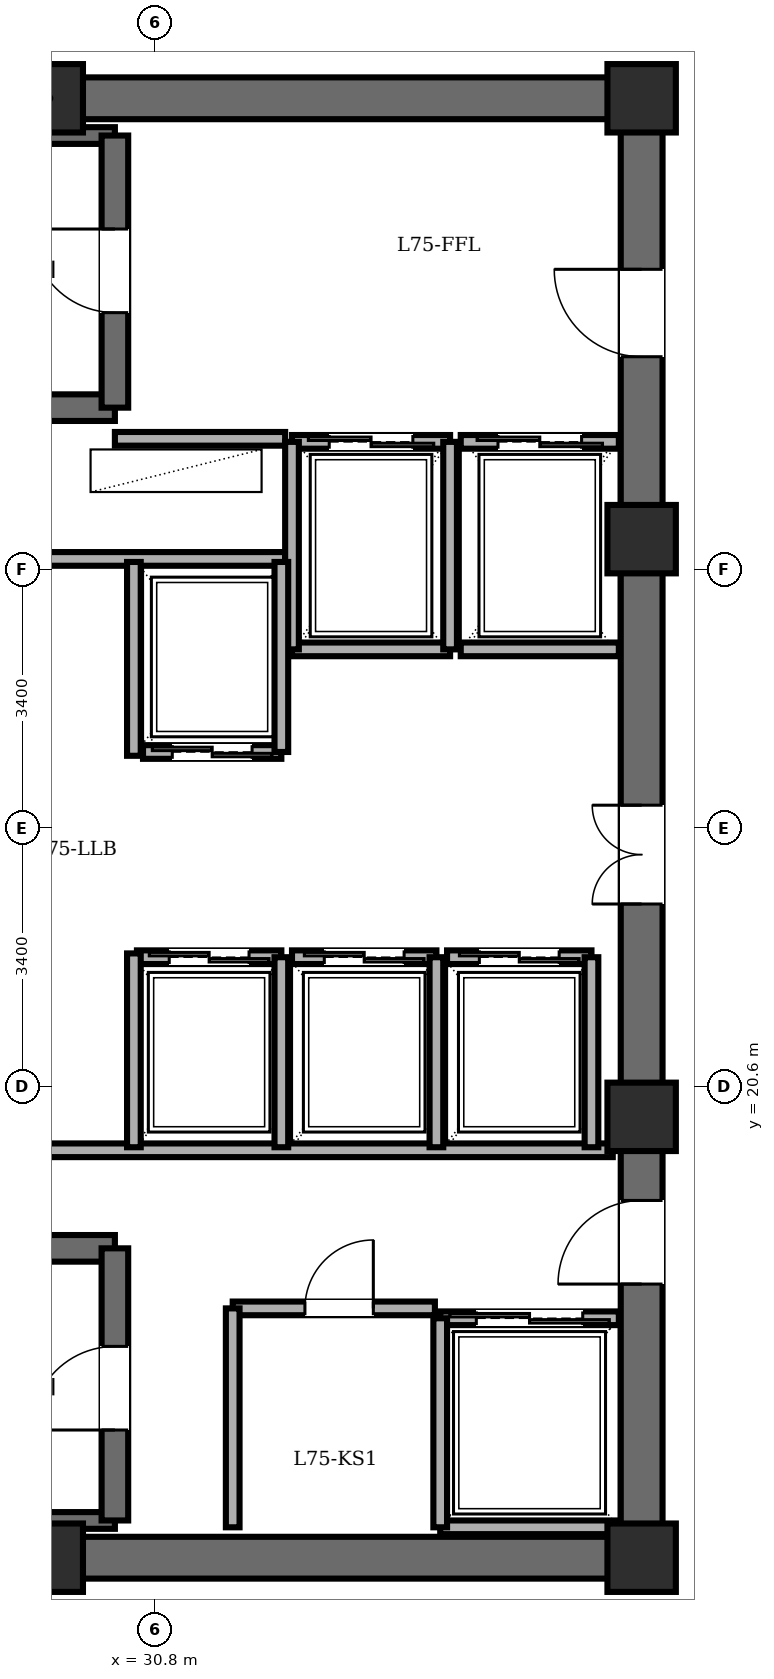
"""IFC4 building model, lengths in metres.
Left out: names, types, materials, properties, quantities, classifications, styles, units other than length and angle.
Written with IfcOpenShell. Run it as: python <this file> out.ifc"""

import sys

from ifc_helpers import new_model, si_unit, direction, frame, frame_2d, origin, origin_2d, place, context, subcontext, project, spatial, rectangle, extrude, element, fill, save


model = new_model("IFC4")
c1 = context("Model", 3, precision=1e-05, world=origin(), true_north=direction((0.0, 1.0)))
c2 = subcontext(c1, "Body", "Model", "MODEL_VIEW")
j1 = project(units=[si_unit("LENGTHUNIT", "METRE"), si_unit("PLANEANGLEUNIT", "RADIAN")], contexts=[c1])
p1 = place(None, origin())
s1 = spatial("IfcSite", under=j1, at=p1, CompositionType="ELEMENT")
p2 = place(p1, origin())
s2 = spatial("IfcBuilding", under=s1, at=p2, CompositionType="ELEMENT")
p3 = place(p2, frame((0.0, 0.0, 288.0)))
s3 = spatial("IfcBuildingStorey", under=s2, at=p3, CompositionType="ELEMENT", Elevation=288.0)
for number, where, z_axis, x_axis in (
    (1, (29.4, 14.4, 0.0), (0.0, 0.0, 1.0), (1.0, 0.0, 0.0)),
    (2, (37.2, 14.4, 0.0), (0.0, 0.0, 1.0), (1.0, 0.0, 0.0)),
    (3, (37.2, 20.2, 0.0), (0.0, 0.0, 1.0), (1.0, 0.0, 0.0)),
    (4, (37.2, 27.8, 0.0), (0.0, 0.0, 1.0), (1.0, 0.0, 0.0)),
    (5, (37.2, 33.6, 0.0), (0.0, 0.0, 1.0), (1.0, 0.0, 0.0)),
    (6, (29.4, 33.6, 0.0), (0.0, 0.0, 1.0), (1.0, 0.0, 0.0)),
):
    element("IfcColumn", number, at=place(p3, frame(where, z_axis=z_axis, x_axis=x_axis)), inside=s3, PredefinedType="COLUMN", context=c2, shape_type="SweptSolid", body=[
        extrude(rectangle(XDim=0.9, YDim=0.9, at=origin_2d()), origin(), (0.0, 0.0, 1.0), 3.65),
    ])
for number, where, z_axis, x_axis in (
    (7, (21.6, 33.6, 0.0), (0.0, 0.0, 1.0), (1.0, 0.0, 0.0)),
    (8, (37.2, 14.4, 0.0), (0.0, 0.0, 1.0), (-1.0, 0.0, 0.0)),
):
    element("IfcWall", number, at=place(p3, frame(where, z_axis=z_axis, x_axis=x_axis)), inside=s3, PredefinedType="SHEAR", context=c2, shape_type="SweptSolid", body=[
        extrude(rectangle(XDim=15.6, YDim=0.55, at=frame_2d((7.8, 0.0))), origin(), (0.0, 0.0, 1.0), 3.45),
    ])
p4 = place(p3, frame((37.2, 14.4, 0.0), z_axis=(0.0, 0.0, 1.0), x_axis=(0.0, 1.0, 0.0)))
e9 = element("IfcWall", 9, at=p4, inside=s3, PredefinedType="SHEAR", context=c2, shape_type="SweptSolid", body=[
    extrude(rectangle(XDim=19.2, YDim=0.55, at=frame_2d((9.6, 0.0))), origin(), (0.0, 0.0, 1.0), 3.45),
])
p5 = place(p4, frame((15.8, 0.0, 0.0)))
e10 = element("IfcOpeningElement", 10, at=p5, cuts=e9, PredefinedType="OPENING", context=c2, shape_type="SweptSolid", body=[
    extrude(rectangle(XDim=1.15, YDim=2.15, at=frame_2d((0.575, 1.075))), frame((0.0, 0.285, 0.0), z_axis=(0.0, -1.0, 0.0), x_axis=(1.0, 0.0, 0.0)), (0.0, 0.0, 1.0), 0.57),
])
p6 = place(p4, frame((3.6, 0.0, 0.0)))
e11 = element("IfcOpeningElement", 11, at=p6, cuts=e9, PredefinedType="OPENING", context=c2, shape_type="SweptSolid", body=[
    extrude(rectangle(XDim=1.1, YDim=2.15, at=frame_2d((0.55, 1.075))), frame((0.0, 0.285, 0.0), z_axis=(0.0, -1.0, 0.0), x_axis=(1.0, 0.0, 0.0)), (0.0, 0.0, 1.0), 0.57),
])
p7 = place(p4, frame((8.6, 0.0, 0.0)))
e12 = element("IfcOpeningElement", 12, at=p7, cuts=e9, PredefinedType="OPENING", context=c2, shape_type="SweptSolid", body=[
    extrude(rectangle(XDim=1.3, YDim=2.2, at=frame_2d((0.65, 1.1))), frame((0.0, 0.285, 0.0), z_axis=(0.0, -1.0, 0.0), x_axis=(1.0, 0.0, 0.0)), (0.0, 0.0, 1.0), 0.57),
])
p8 = place(p3, frame((22.48, 29.53, 0.0), z_axis=(0.0, 0.0, 1.0), x_axis=(1.0, 0.0, 0.0)))
e13 = element("IfcWall", 13, at=p8, inside=s3, PredefinedType="SOLIDWALL", context=c2, shape_type="SweptSolid", body=[
    extrude(rectangle(XDim=7.79, YDim=0.35, at=frame_2d((3.895, 0.0))), origin(), (0.0, 0.0, 1.0), 3.45),
])
p9 = place(p3, frame((22.48, 33.11, 0.0), z_axis=(0.0, 0.0, 1.0), x_axis=(1.0, 0.0, 0.0)))
e14 = element("IfcWall", 14, at=p9, inside=s3, PredefinedType="PARTITIONING", context=c2, shape_type="SweptSolid", body=[
    extrude(rectangle(XDim=7.79, YDim=0.22, at=frame_2d((3.895, 0.0))), origin(), (0.0, 0.0, 1.0), 3.45),
])
p10 = place(p3, frame((30.27, 29.53, 0.0), z_axis=(0.0, 0.0, 1.0), x_axis=(0.0, 1.0, 0.0)))
e15 = element("IfcWall", 15, at=p10, inside=s3, PredefinedType="SOLIDWALL", context=c2, shape_type="SweptSolid", body=[
    extrude(rectangle(XDim=3.58, YDim=0.35, at=frame_2d((1.79, 0.0))), origin(), (0.0, 0.0, 1.0), 3.45),
])
p11 = place(p10, frame((1.25, 0.0, 0.0)))
e16 = element("IfcOpeningElement", 16, at=p11, cuts=e15, PredefinedType="OPENING", context=c2, shape_type="SweptSolid", body=[
    extrude(rectangle(XDim=1.1, YDim=2.15, at=frame_2d((0.55, 1.075))), frame((0.0, 0.185, 0.0), z_axis=(0.0, -1.0, 0.0), x_axis=(1.0, 0.0, 0.0)), (0.0, 0.0, 1.0), 0.37),
])
p12 = place(p3, frame((22.48, 18.47, 0.0), z_axis=(0.0, 0.0, 1.0), x_axis=(1.0, 0.0, 0.0)))
e17 = element("IfcWall", 17, at=p12, inside=s3, PredefinedType="SOLIDWALL", context=c2, shape_type="SweptSolid", body=[
    extrude(rectangle(XDim=7.79, YDim=0.35, at=frame_2d((3.895, 0.0))), origin(), (0.0, 0.0, 1.0), 3.45),
])
p13 = place(p3, frame((22.48, 14.89, 0.0), z_axis=(0.0, 0.0, 1.0), x_axis=(1.0, 0.0, 0.0)))
e18 = element("IfcWall", 18, at=p13, inside=s3, PredefinedType="PARTITIONING", context=c2, shape_type="SweptSolid", body=[
    extrude(rectangle(XDim=7.79, YDim=0.22, at=frame_2d((3.895, 0.0))), origin(), (0.0, 0.0, 1.0), 3.45),
])
p14 = place(p3, frame((30.27, 14.89, 0.0), z_axis=(0.0, 0.0, 1.0), x_axis=(0.0, 1.0, 0.0)))
e19 = element("IfcWall", 19, at=p14, inside=s3, PredefinedType="SOLIDWALL", context=c2, shape_type="SweptSolid", body=[
    extrude(rectangle(XDim=3.58, YDim=0.35, at=frame_2d((1.79, 0.0))), origin(), (0.0, 0.0, 1.0), 3.45),
])
p15 = place(p14, frame((1.19, 0.0, 0.0)))
e20 = element("IfcOpeningElement", 20, at=p15, cuts=e19, PredefinedType="OPENING", context=c2, shape_type="SweptSolid", body=[
    extrude(rectangle(XDim=1.1, YDim=2.15, at=frame_2d((0.55, 1.075))), frame((0.0, 0.185, 0.0), z_axis=(0.0, -1.0, 0.0), x_axis=(1.0, 0.0, 0.0)), (0.0, 0.0, 1.0), 0.37),
])
p16 = place(p3, frame((30.27, 29.12, 0.0), z_axis=(0.0, 0.0, 1.0), x_axis=(1.0, 0.0, 0.0)))
e21 = element("IfcWall", 21, at=p16, inside=s3, PredefinedType="PARTITIONING", context=c2, shape_type="SweptSolid", body=[
    extrude(rectangle(XDim=2.24, YDim=0.18, at=frame_2d((1.12, 0.0))), origin(), (0.0, 0.0, 1.0), 3.45),
])
p17 = place(p3, frame((21.95, 27.54, 0.0), z_axis=(0.0, 0.0, 1.0), x_axis=(1.0, 0.0, 0.0)))
e22 = element("IfcWall", 22, at=p17, inside=s3, PredefinedType="PARTITIONING", context=c2, shape_type="SweptSolid", body=[
    extrude(rectangle(XDim=10.56, YDim=0.18, at=frame_2d((5.28, 0.0))), origin(), (0.0, 0.0, 1.0), 3.45),
])
p18 = place(p3, frame((21.95, 19.76, 0.0), z_axis=(0.0, 0.0, 1.0), x_axis=(1.0, 0.0, 0.0)))
e23 = element("IfcWall", 23, at=p18, inside=s3, PredefinedType="PARTITIONING", context=c2, shape_type="SweptSolid", body=[
    extrude(rectangle(XDim=14.87, YDim=0.18, at=frame_2d((7.435, 0.0))), origin(), (0.0, 0.0, 1.0), 3.45),
])
p19 = place(p3, frame((31.82, 17.68, 0.0), z_axis=(0.0, 0.0, 1.0), x_axis=(1.0, 0.0, 0.0)))
e24 = element("IfcWall", 24, at=p19, inside=s3, PredefinedType="PARTITIONING", context=c2, shape_type="SweptSolid", body=[
    extrude(rectangle(XDim=2.66, YDim=0.18, at=frame_2d((1.33, 0.0))), origin(), (0.0, 0.0, 1.0), 3.45),
])
p20 = place(p19, frame((0.95, 0.0, 0.0)))
e25 = element("IfcOpeningElement", 25, at=p20, cuts=e24, PredefinedType="OPENING", context=c2, shape_type="SweptSolid", body=[
    extrude(rectangle(XDim=0.9, YDim=2.05, at=frame_2d((0.45, 1.025))), frame((0.0, 0.1, 0.0), z_axis=(0.0, -1.0, 0.0), x_axis=(1.0, 0.0, 0.0)), (0.0, 0.0, 1.0), 0.2),
])
p21 = place(p3, frame((31.82, 14.8, 0.0), z_axis=(0.0, 0.0, 1.0), x_axis=(0.0, 1.0, 0.0)))
e26 = element("IfcWall", 26, at=p21, inside=s3, PredefinedType="PARTITIONING", context=c2, shape_type="SweptSolid", body=[
    extrude(rectangle(XDim=2.88, YDim=0.18, at=frame_2d((1.44, 0.0))), origin(), (0.0, 0.0, 1.0), 3.45),
])
p22 = place(p3, frame((32.6, 29.08, 0.0), z_axis=(0.0, 0.0, 1.0), x_axis=(1.0, 0.0, 0.0)))
e27 = element("IfcWall", 27, at=p22, inside=s3, PredefinedType="PARTITIONING", context=c2, shape_type="SweptSolid", body=[
    extrude(rectangle(XDim=2.08, YDim=0.18, at=frame_2d((1.04, 0.0))), origin(), (0.0, 0.0, 1.0), 3.45),
])
p23 = place(p22, frame((0.49, 0.0, 0.0)))
e28 = element("IfcOpeningElement", 28, at=p23, cuts=e27, PredefinedType="OPENING", context=c2, shape_type="SweptSolid", body=[
    extrude(rectangle(XDim=1.1, YDim=2.2, at=frame_2d((0.55, 1.1))), frame((0.0, 0.1, 0.0), z_axis=(0.0, -1.0, 0.0), x_axis=(1.0, 0.0, 0.0)), (0.0, 0.0, 1.0), 0.2),
])
p24 = place(p3, frame((34.68, 26.35, 0.0), z_axis=(0.0, 0.0, 1.0), x_axis=(-1.0, 0.0, 0.0)))
e29 = element("IfcWall", 29, at=p24, inside=s3, PredefinedType="PARTITIONING", context=c2, shape_type="SweptSolid", body=[
    extrude(rectangle(XDim=2.08, YDim=0.18, at=frame_2d((1.04, 0.0))), origin(), (0.0, 0.0, 1.0), 3.45),
])
for number, where, z_axis, x_axis in (
    (30, (34.68, 26.35, 0.0), (0.0, 0.0, 1.0), (0.0, 1.0, 0.0)),
    (31, (32.6, 29.08, 0.0), (0.0, 0.0, 1.0), (0.0, -1.0, 0.0)),
):
    element("IfcWall", number, at=place(p3, frame(where, z_axis=z_axis, x_axis=x_axis)), inside=s3, PredefinedType="PARTITIONING", context=c2, shape_type="SweptSolid", body=[
        extrude(rectangle(XDim=2.73, YDim=0.18, at=frame_2d((1.365, 0.0))), origin(), (0.0, 0.0, 1.0), 3.45),
    ])
p25 = place(p3, frame((34.82, 29.08, 0.0), z_axis=(0.0, 0.0, 1.0), x_axis=(1.0, 0.0, 0.0)))
e32 = element("IfcWall", 32, at=p25, inside=s3, PredefinedType="PARTITIONING", context=c2, shape_type="SweptSolid", body=[
    extrude(rectangle(XDim=2.08, YDim=0.18, at=frame_2d((1.04, 0.0))), origin(), (0.0, 0.0, 1.0), 3.45),
])
p26 = place(p25, frame((0.49, 0.0, 0.0)))
e33 = element("IfcOpeningElement", 33, at=p26, cuts=e32, PredefinedType="OPENING", context=c2, shape_type="SweptSolid", body=[
    extrude(rectangle(XDim=1.1, YDim=2.2, at=frame_2d((0.55, 1.1))), frame((0.0, 0.1, 0.0), z_axis=(0.0, -1.0, 0.0), x_axis=(1.0, 0.0, 0.0)), (0.0, 0.0, 1.0), 0.2),
])
p27 = place(p3, frame((36.9, 26.35, 0.0), z_axis=(0.0, 0.0, 1.0), x_axis=(-1.0, 0.0, 0.0)))
e34 = element("IfcWall", 34, at=p27, inside=s3, PredefinedType="PARTITIONING", context=c2, shape_type="SweptSolid", body=[
    extrude(rectangle(XDim=2.08, YDim=0.18, at=frame_2d((1.04, 0.0))), origin(), (0.0, 0.0, 1.0), 3.45),
])
p28 = place(p3, frame((34.55, 17.55, 0.0), z_axis=(0.0, 0.0, 1.0), x_axis=(1.0, 0.0, 0.0)))
e35 = element("IfcWall", 35, at=p28, inside=s3, PredefinedType="PARTITIONING", context=c2, shape_type="SweptSolid", body=[
    extrude(rectangle(XDim=2.35, YDim=0.18, at=frame_2d((1.175, 0.0))), origin(), (0.0, 0.0, 1.0), 3.45),
])
p29 = place(p28, frame((0.475, 0.0, 0.0)))
e36 = element("IfcOpeningElement", 36, at=p29, cuts=e35, PredefinedType="OPENING", context=c2, shape_type="SweptSolid", body=[
    extrude(rectangle(XDim=1.4, YDim=2.3, at=frame_2d((0.7, 1.15))), frame((0.0, 0.1, 0.0), z_axis=(0.0, -1.0, 0.0), x_axis=(1.0, 0.0, 0.0)), (0.0, 0.0, 1.0), 0.2),
])
p30 = place(p3, frame((36.9, 14.8, 0.0), z_axis=(0.0, 0.0, 1.0), x_axis=(-1.0, 0.0, 0.0)))
e37 = element("IfcWall", 37, at=p30, inside=s3, PredefinedType="PARTITIONING", context=c2, shape_type="SweptSolid", body=[
    extrude(rectangle(XDim=2.35, YDim=0.18, at=frame_2d((1.175, 0.0))), origin(), (0.0, 0.0, 1.0), 3.45),
])
p31 = place(p3, frame((34.55, 17.55, 0.0), z_axis=(0.0, 0.0, 1.0), x_axis=(0.0, -1.0, 0.0)))
e38 = element("IfcWall", 38, at=p31, inside=s3, PredefinedType="PARTITIONING", context=c2, shape_type="SweptSolid", body=[
    extrude(rectangle(XDim=2.75, YDim=0.18, at=frame_2d((1.375, 0.0))), origin(), (0.0, 0.0, 1.0), 3.45),
])
p32 = place(p3, frame((32.46, 25.0, 0.0), z_axis=(0.0, 0.0, 1.0), x_axis=(-1.0, 0.0, 0.0)))
e39 = element("IfcWall", 39, at=p32, inside=s3, PredefinedType="PARTITIONING", context=c2, shape_type="SweptSolid", body=[
    extrude(rectangle(XDim=1.82, YDim=0.18, at=frame_2d((0.91, 0.0))), origin(), (0.0, 0.0, 1.0), 3.45),
])
p33 = place(p32, frame((0.385, 0.0, 0.0)))
e40 = element("IfcOpeningElement", 40, at=p33, cuts=e39, PredefinedType="OPENING", context=c2, shape_type="SweptSolid", body=[
    extrude(rectangle(XDim=1.05, YDim=2.2, at=frame_2d((0.525, 1.1))), frame((0.0, 0.1, 0.0), z_axis=(0.0, -1.0, 0.0), x_axis=(1.0, 0.0, 0.0)), (0.0, 0.0, 1.0), 0.2),
])
p34 = place(p3, frame((32.46, 25.0, 0.0), z_axis=(0.0, 0.0, 1.0), x_axis=(0.0, 1.0, 0.0)))
e41 = element("IfcWall", 41, at=p34, inside=s3, PredefinedType="PARTITIONING", context=c2, shape_type="SweptSolid", body=[
    extrude(rectangle(XDim=2.5, YDim=0.18, at=frame_2d((1.25, 0.0))), origin(), (0.0, 0.0, 1.0), 3.45),
])
p35 = place(p3, frame((30.56, 22.3, 0.0), z_axis=(0.0, 0.0, 1.0), x_axis=(1.0, 0.0, 0.0)))
e42 = element("IfcWall", 42, at=p35, inside=s3, PredefinedType="PARTITIONING", context=c2, shape_type="SweptSolid", body=[
    extrude(rectangle(XDim=1.9, YDim=0.18, at=frame_2d((0.95, 0.0))), origin(), (0.0, 0.0, 1.0), 3.45),
])
p36 = place(p35, frame((0.425, 0.0, 0.0)))
e43 = element("IfcOpeningElement", 43, at=p36, cuts=e42, PredefinedType="OPENING", context=c2, shape_type="SweptSolid", body=[
    extrude(rectangle(XDim=1.05, YDim=2.2, at=frame_2d((0.525, 1.1))), frame((0.0, 0.1, 0.0), z_axis=(0.0, -1.0, 0.0), x_axis=(1.0, 0.0, 0.0)), (0.0, 0.0, 1.0), 0.2),
])
p37 = place(p3, frame((32.46, 19.8, 0.0), z_axis=(0.0, 0.0, 1.0), x_axis=(0.0, 1.0, 0.0)))
e44 = element("IfcWall", 44, at=p37, inside=s3, PredefinedType="PARTITIONING", context=c2, shape_type="SweptSolid", body=[
    extrude(rectangle(XDim=2.5, YDim=0.18, at=frame_2d((1.25, 0.0))), origin(), (0.0, 0.0, 1.0), 3.45),
])
p38 = place(p3, frame((32.6, 22.3, 0.0), z_axis=(0.0, 0.0, 1.0), x_axis=(1.0, 0.0, 0.0)))
e45 = element("IfcWall", 45, at=p38, inside=s3, PredefinedType="PARTITIONING", context=c2, shape_type="SweptSolid", body=[
    extrude(rectangle(XDim=1.9, YDim=0.18, at=frame_2d((0.95, 0.0))), origin(), (0.0, 0.0, 1.0), 3.45),
])
p39 = place(p38, frame((0.425, 0.0, 0.0)))
e46 = element("IfcOpeningElement", 46, at=p39, cuts=e45, PredefinedType="OPENING", context=c2, shape_type="SweptSolid", body=[
    extrude(rectangle(XDim=1.05, YDim=2.2, at=frame_2d((0.525, 1.1))), frame((0.0, 0.1, 0.0), z_axis=(0.0, -1.0, 0.0), x_axis=(1.0, 0.0, 0.0)), (0.0, 0.0, 1.0), 0.2),
])
p40 = place(p3, frame((34.5, 19.8, 0.0), z_axis=(0.0, 0.0, 1.0), x_axis=(0.0, 1.0, 0.0)))
e47 = element("IfcWall", 47, at=p40, inside=s3, PredefinedType="PARTITIONING", context=c2, shape_type="SweptSolid", body=[
    extrude(rectangle(XDim=2.5, YDim=0.18, at=frame_2d((1.25, 0.0))), origin(), (0.0, 0.0, 1.0), 3.45),
])
p41 = place(p3, frame((34.64, 22.3, 0.0), z_axis=(0.0, 0.0, 1.0), x_axis=(1.0, 0.0, 0.0)))
e48 = element("IfcWall", 48, at=p41, inside=s3, PredefinedType="PARTITIONING", context=c2, shape_type="SweptSolid", body=[
    extrude(rectangle(XDim=1.9, YDim=0.18, at=frame_2d((0.95, 0.0))), origin(), (0.0, 0.0, 1.0), 3.45),
])
p42 = place(p41, frame((0.425, 0.0, 0.0)))
e49 = element("IfcOpeningElement", 49, at=p42, cuts=e48, PredefinedType="OPENING", context=c2, shape_type="SweptSolid", body=[
    extrude(rectangle(XDim=1.05, YDim=2.2, at=frame_2d((0.525, 1.1))), frame((0.0, 0.1, 0.0), z_axis=(0.0, -1.0, 0.0), x_axis=(1.0, 0.0, 0.0)), (0.0, 0.0, 1.0), 0.2),
])
p43 = place(p3, frame((36.54, 19.8, 0.0), z_axis=(0.0, 0.0, 1.0), x_axis=(0.0, 1.0, 0.0)))
e50 = element("IfcWall", 50, at=p43, inside=s3, PredefinedType="PARTITIONING", context=c2, shape_type="SweptSolid", body=[
    extrude(rectangle(XDim=2.5, YDim=0.18, at=frame_2d((1.25, 0.0))), origin(), (0.0, 0.0, 1.0), 3.45),
])
for number, where, z_axis, x_axis in (
    (51, (30.52, 24.95, 0.0), (0.0, 0.0, 1.0), (0.0, 1.0, 0.0)),
    (52, (30.52, 19.8, 0.0), (0.0, 0.0, 1.0), (0.0, 1.0, 0.0)),
):
    element("IfcWall", number, at=place(p3, frame(where, z_axis=z_axis, x_axis=x_axis)), inside=s3, PredefinedType="PARTITIONING", context=c2, shape_type="SweptSolid", body=[
        extrude(rectangle(XDim=2.55, YDim=0.18, at=frame_2d((1.275, 0.0))), origin(), (0.0, 0.0, 1.0), 3.45),
    ])
p44 = place(p11, origin())
e53 = element("IfcDoor", 53, at=p44, inside=s3, OperationType="SINGLE_SWING_RIGHT", PredefinedType="DOOR", context=c2, shape_type="SweptSolid", body=[
    extrude(rectangle(XDim=1.1, YDim=2.15, at=frame_2d((0.55, 1.075))), frame((0.0, 0.025, 0.0), z_axis=(0.0, -1.0, 0.0), x_axis=(1.0, 0.0, 0.0)), (0.0, 0.0, 1.0), 0.05),
])
fill(e16, e53)
p45 = place(p15, origin())
e54 = element("IfcDoor", 54, at=p45, inside=s3, OperationType="SINGLE_SWING_LEFT", PredefinedType="DOOR", context=c2, shape_type="SweptSolid", body=[
    extrude(rectangle(XDim=1.1, YDim=2.15, at=frame_2d((0.55, 1.075))), frame((0.0, 0.025, 0.0), z_axis=(0.0, -1.0, 0.0), x_axis=(1.0, 0.0, 0.0)), (0.0, 0.0, 1.0), 0.05),
])
fill(e20, e54)
p46 = place(p5, origin())
e55 = element("IfcDoor", 55, at=p46, inside=s3, OperationType="SINGLE_SWING_RIGHT", PredefinedType="DOOR", context=c2, shape_type="SweptSolid", body=[
    extrude(rectangle(XDim=1.15, YDim=2.15, at=frame_2d((0.575, 1.075))), frame((0.0, 0.025, 0.0), z_axis=(0.0, -1.0, 0.0), x_axis=(1.0, 0.0, 0.0)), (0.0, 0.0, 1.0), 0.05),
])
fill(e10, e55)
p47 = place(p6, origin())
e56 = element("IfcDoor", 56, at=p47, inside=s3, OperationType="SINGLE_SWING_LEFT", PredefinedType="DOOR", context=c2, shape_type="SweptSolid", body=[
    extrude(rectangle(XDim=1.1, YDim=2.15, at=frame_2d((0.55, 1.075))), frame((0.0, 0.025, 0.0), z_axis=(0.0, -1.0, 0.0), x_axis=(1.0, 0.0, 0.0)), (0.0, 0.0, 1.0), 0.05),
])
fill(e11, e56)
p48 = place(p20, origin())
e57 = element("IfcDoor", 57, at=p48, inside=s3, OperationType="SINGLE_SWING_RIGHT", PredefinedType="DOOR", context=c2, shape_type="SweptSolid", body=[
    extrude(rectangle(XDim=0.9, YDim=2.05, at=frame_2d((0.45, 1.025))), frame((0.0, 0.025, 0.0), z_axis=(0.0, -1.0, 0.0), x_axis=(1.0, 0.0, 0.0)), (0.0, 0.0, 1.0), 0.05),
])
fill(e25, e57)
p49 = place(p23, origin())
e58 = element("IfcDoor", 58, at=p49, inside=s3, OperationType="DOUBLE_DOOR_SLIDING", PredefinedType="DOOR", context=c2, shape_type="SweptSolid", body=[
    extrude(rectangle(XDim=1.1, YDim=2.2, at=frame_2d((0.55, 1.1))), frame((0.0, 0.025, 0.0), z_axis=(0.0, -1.0, 0.0), x_axis=(1.0, 0.0, 0.0)), (0.0, 0.0, 1.0), 0.05),
])
fill(e28, e58)
p50 = place(p26, origin())
e59 = element("IfcDoor", 59, at=p50, inside=s3, OperationType="DOUBLE_DOOR_SLIDING", PredefinedType="DOOR", context=c2, shape_type="SweptSolid", body=[
    extrude(rectangle(XDim=1.1, YDim=2.2, at=frame_2d((0.55, 1.1))), frame((0.0, 0.025, 0.0), z_axis=(0.0, -1.0, 0.0), x_axis=(1.0, 0.0, 0.0)), (0.0, 0.0, 1.0), 0.05),
])
fill(e33, e59)
p51 = place(p29, origin())
e60 = element("IfcDoor", 60, at=p51, inside=s3, OperationType="DOUBLE_DOOR_SLIDING", PredefinedType="DOOR", context=c2, shape_type="SweptSolid", body=[
    extrude(rectangle(XDim=1.4, YDim=2.3, at=frame_2d((0.7, 1.15))), frame((0.0, 0.025, 0.0), z_axis=(0.0, -1.0, 0.0), x_axis=(1.0, 0.0, 0.0)), (0.0, 0.0, 1.0), 0.05),
])
fill(e36, e60)
p52 = place(p33, origin())
e61 = element("IfcDoor", 61, at=p52, inside=s3, OperationType="DOUBLE_DOOR_SLIDING", PredefinedType="DOOR", context=c2, shape_type="SweptSolid", body=[
    extrude(rectangle(XDim=1.05, YDim=2.2, at=frame_2d((0.525, 1.1))), frame((0.0, 0.025, 0.0), z_axis=(0.0, -1.0, 0.0), x_axis=(1.0, 0.0, 0.0)), (0.0, 0.0, 1.0), 0.05),
])
fill(e40, e61)
p53 = place(p36, origin())
e62 = element("IfcDoor", 62, at=p53, inside=s3, OperationType="DOUBLE_DOOR_SLIDING", PredefinedType="DOOR", context=c2, shape_type="SweptSolid", body=[
    extrude(rectangle(XDim=1.05, YDim=2.2, at=frame_2d((0.525, 1.1))), frame((0.0, 0.025, 0.0), z_axis=(0.0, -1.0, 0.0), x_axis=(1.0, 0.0, 0.0)), (0.0, 0.0, 1.0), 0.05),
])
fill(e43, e62)
p54 = place(p39, origin())
e63 = element("IfcDoor", 63, at=p54, inside=s3, OperationType="DOUBLE_DOOR_SLIDING", PredefinedType="DOOR", context=c2, shape_type="SweptSolid", body=[
    extrude(rectangle(XDim=1.05, YDim=2.2, at=frame_2d((0.525, 1.1))), frame((0.0, 0.025, 0.0), z_axis=(0.0, -1.0, 0.0), x_axis=(1.0, 0.0, 0.0)), (0.0, 0.0, 1.0), 0.05),
])
fill(e46, e63)
p55 = place(p42, origin())
e64 = element("IfcDoor", 64, at=p55, inside=s3, OperationType="DOUBLE_DOOR_SLIDING", PredefinedType="DOOR", context=c2, shape_type="SweptSolid", body=[
    extrude(rectangle(XDim=1.05, YDim=2.2, at=frame_2d((0.525, 1.1))), frame((0.0, 0.025, 0.0), z_axis=(0.0, -1.0, 0.0), x_axis=(1.0, 0.0, 0.0)), (0.0, 0.0, 1.0), 0.05),
])
fill(e49, e64)
p56 = place(p7, origin())
e65 = element("IfcDoor", 65, at=p56, inside=s3, OperationType="DOUBLE_DOOR_SINGLE_SWING", PredefinedType="DOOR", context=c2, shape_type="SweptSolid", body=[
    extrude(rectangle(XDim=1.3, YDim=2.2, at=frame_2d((0.65, 1.1))), frame((0.0, 0.025, 0.0), z_axis=(0.0, -1.0, 0.0), x_axis=(1.0, 0.0, 0.0)), (0.0, 0.0, 1.0), 0.05),
])
fill(e12, e65)
save(model, sys.argv[1])
